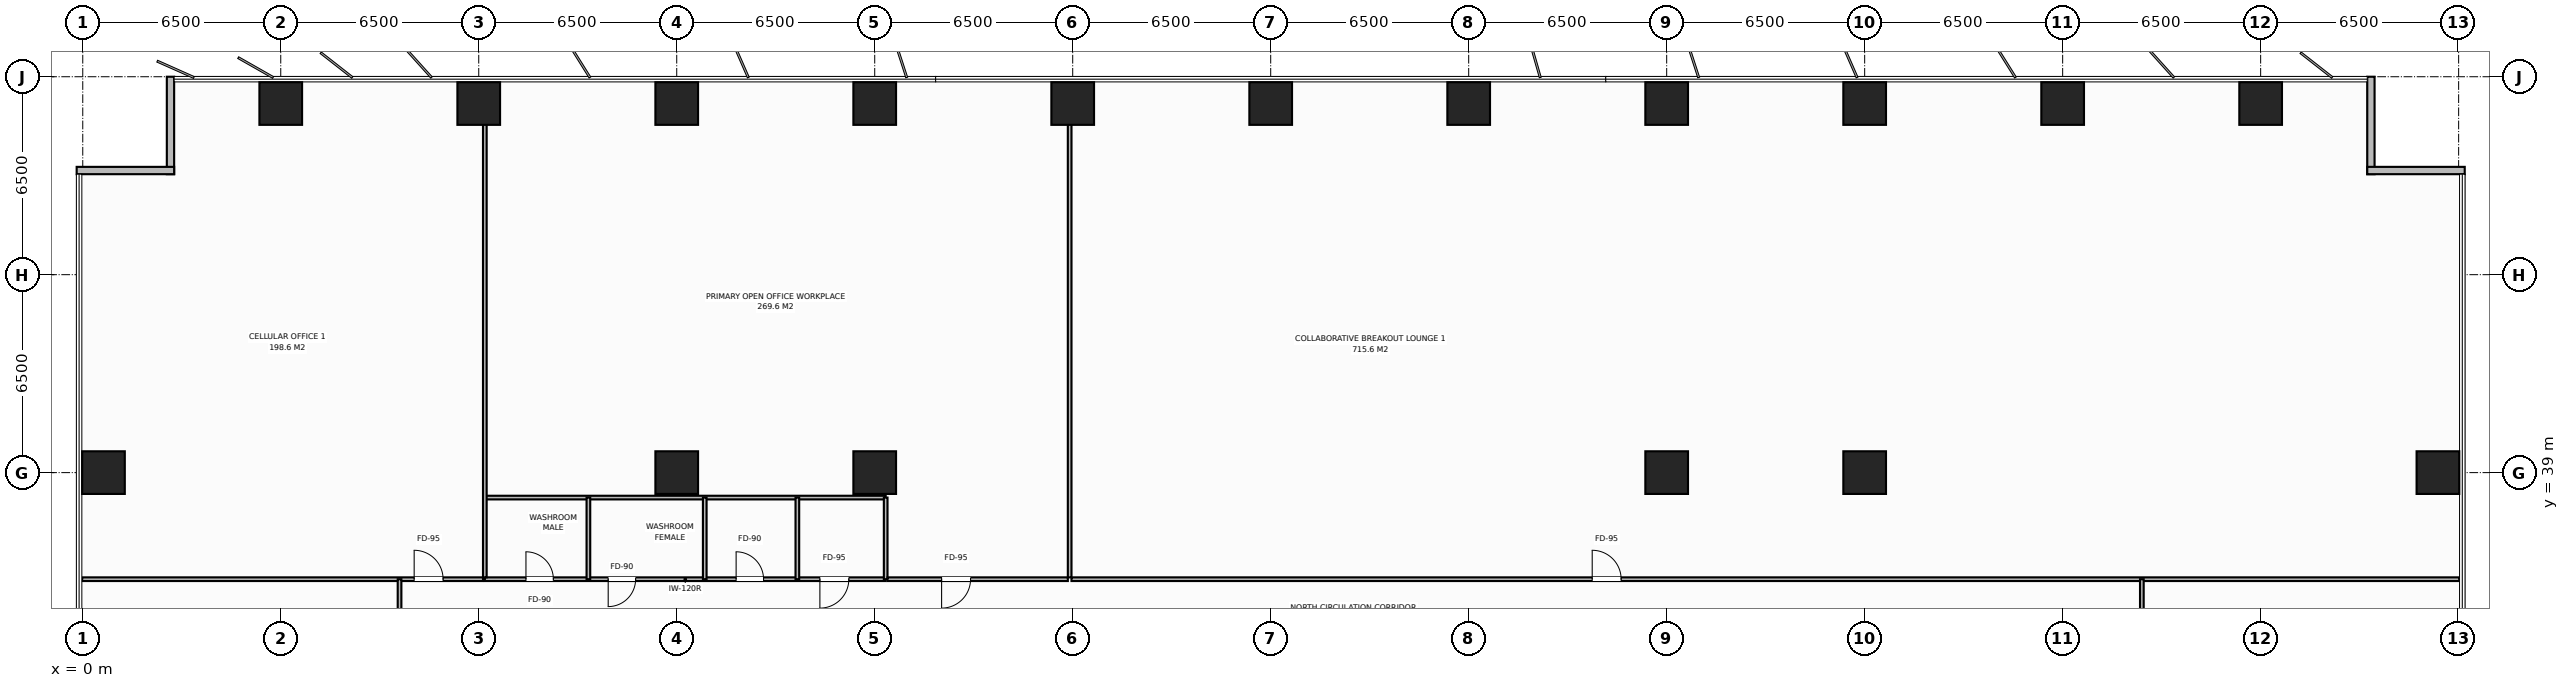
"""IFC4 building model, lengths in metres.
Left out: names, types, materials, properties, quantities, classifications, styles, units other than length and angle.
Written with IfcOpenShell. Run it as: python <this file> out.ifc"""

import sys

from ifc_helpers import new_model, si_unit, direction, frame, frame_2d, origin, origin_2d, place, context, subcontext, project, spatial, rectangle, extrude, element, fill, save


model = new_model("IFC4")
c1 = context("Model", 3, precision=1e-05, world=origin(), true_north=direction((0.0, 1.0)))
c2 = subcontext(c1, "Body", "Model", "MODEL_VIEW")
j1 = project(units=[si_unit("LENGTHUNIT", "METRE"), si_unit("PLANEANGLEUNIT", "RADIAN")], contexts=[c1])
p1 = place(None, origin())
s1 = spatial("IfcSite", under=j1, at=p1, CompositionType="ELEMENT")
p2 = place(p1, origin())
s2 = spatial("IfcBuilding", under=s1, at=p2, CompositionType="ELEMENT")
p3 = place(p2, frame((0.0, 0.0, 31.6)))
s3 = spatial("IfcBuildingStorey", under=s2, at=p3, CompositionType="ELEMENT", Elevation=31.6)
for number, where, z_axis, x_axis in (
    (1, (19.5, 39.0, 0.0), (0.0, 0.0, 1.0), (1.0, 0.0, 0.0)),
    (2, (58.5, 39.0, 0.0), (0.0, 0.0, 1.0), (1.0, 0.0, 0.0)),
    (3, (26.0, 39.0, 0.0), (0.0, 0.0, 1.0), (1.0, 0.0, 0.0)),
    (4, (52.0, 39.0, 0.0), (0.0, 0.0, 1.0), (1.0, 0.0, 0.0)),
    (5, (6.5, 51.12, 0.0), (0.0, 0.0, 1.0), (1.0, 0.0, 0.0)),
    (6, (13.0, 51.12, 0.0), (0.0, 0.0, 1.0), (1.0, 0.0, 0.0)),
    (7, (19.5, 51.12, 0.0), (0.0, 0.0, 1.0), (1.0, 0.0, 0.0)),
    (8, (26.0, 51.12, 0.0), (0.0, 0.0, 1.0), (1.0, 0.0, 0.0)),
    (9, (32.5, 51.12, 0.0), (0.0, 0.0, 1.0), (1.0, 0.0, 0.0)),
    (10, (39.0, 51.12, 0.0), (0.0, 0.0, 1.0), (1.0, 0.0, 0.0)),
    (11, (45.5, 51.12, 0.0), (0.0, 0.0, 1.0), (1.0, 0.0, 0.0)),
    (12, (52.0, 51.12, 0.0), (0.0, 0.0, 1.0), (1.0, 0.0, 0.0)),
    (13, (58.5, 51.12, 0.0), (0.0, 0.0, 1.0), (1.0, 0.0, 0.0)),
    (14, (65.0, 51.12, 0.0), (0.0, 0.0, 1.0), (1.0, 0.0, 0.0)),
    (15, (71.5, 51.12, 0.0), (0.0, 0.0, 1.0), (1.0, 0.0, 0.0)),
    (16, (0.68, 39.0, 0.0), (0.0, 0.0, 1.0), (1.0, 0.0, 0.0)),
    (17, (77.32, 39.0, 0.0), (0.0, 0.0, 1.0), (1.0, 0.0, 0.0)),
):
    element("IfcColumn", number, at=place(p3, frame(where, z_axis=z_axis, x_axis=x_axis)), inside=s3, PredefinedType="COLUMN", context=c2, shape_type="SweptSolid", body=[
        extrude(rectangle(XDim=1.4, YDim=1.4, at=origin_2d()), origin(), (0.0, 0.0, 1.0), 3.8),
    ])
for number, where, z_axis, x_axis in (
    (18, (2.88, 48.8, 0.0), (0.0, 0.0, 1.0), (0.0, 1.0, 0.0)),
    (19, (-0.2, 48.92, 0.0), (0.0, 0.0, 1.0), (1.0, 0.0, 0.0)),
    (20, (75.12, 52.0, 0.0), (0.0, 0.0, 1.0), (0.0, -1.0, 0.0)),
    (21, (75.0, 48.92, 0.0), (0.0, 0.0, 1.0), (1.0, 0.0, 0.0)),
):
    element("IfcWall", number, at=place(p3, frame(where, z_axis=z_axis, x_axis=x_axis)), inside=s3, PredefinedType="STANDARD", context=c2, shape_type="SweptSolid", body=[
        extrude(rectangle(XDim=3.2, YDim=0.24, at=frame_2d((1.6, 0.0))), origin(), (0.0, 0.0, 1.0), 3.55),
    ])
p4 = place(p3, frame((13.2, 35.5, 0.0), z_axis=(0.0, 0.0, 1.0), x_axis=(1.0, 0.0, 0.0)))
e22 = element("IfcWall", 22, at=p4, inside=s3, PredefinedType="PARTITIONING", context=c2, shape_type="SweptSolid", body=[
    extrude(rectangle(XDim=13.16, YDim=0.12, at=frame_2d((6.58, 0.0))), origin(), (0.0, 0.0, 1.0), 3.55),
])
p5 = place(p4, frame((1.35, 0.0, 0.0)))
e23 = element("IfcOpeningElement", 23, at=p5, cuts=e22, PredefinedType="OPENING", context=c2, shape_type="SweptSolid", body=[
    extrude(rectangle(XDim=0.9, YDim=2.15, at=frame_2d((0.45, 1.075))), frame((0.0, 0.07, 0.0), z_axis=(0.0, -1.0, 0.0), x_axis=(1.0, 0.0, 0.0)), (0.0, 0.0, 1.0), 0.14),
])
p6 = place(p4, frame((4.05, 0.0, 0.0)))
e24 = element("IfcOpeningElement", 24, at=p6, cuts=e22, PredefinedType="OPENING", context=c2, shape_type="SweptSolid", body=[
    extrude(rectangle(XDim=0.9, YDim=2.15, at=frame_2d((0.45, 1.075))), frame((0.0, 0.07, 0.0), z_axis=(0.0, -1.0, 0.0), x_axis=(1.0, 0.0, 0.0)), (0.0, 0.0, 1.0), 0.14),
])
p7 = place(p4, frame((8.25, 0.0, 0.0)))
e25 = element("IfcOpeningElement", 25, at=p7, cuts=e22, PredefinedType="OPENING", context=c2, shape_type="SweptSolid", body=[
    extrude(rectangle(XDim=0.9, YDim=2.15, at=frame_2d((0.45, 1.075))), frame((0.0, 0.07, 0.0), z_axis=(0.0, -1.0, 0.0), x_axis=(1.0, 0.0, 0.0)), (0.0, 0.0, 1.0), 0.14),
])
p8 = place(p4, frame((11.0, 0.0, 0.0)))
e26 = element("IfcOpeningElement", 26, at=p8, cuts=e22, PredefinedType="OPENING", context=c2, shape_type="SweptSolid", body=[
    extrude(rectangle(XDim=0.95, YDim=2.15, at=frame_2d((0.475, 1.075))), frame((0.0, 0.07, 0.0), z_axis=(0.0, -1.0, 0.0), x_axis=(1.0, 0.0, 0.0)), (0.0, 0.0, 1.0), 0.14),
])
p9 = place(p3, frame((13.2, 38.18, 0.0), z_axis=(0.0, 0.0, 1.0), x_axis=(1.0, 0.0, 0.0)))
e27 = element("IfcWall", 27, at=p9, inside=s3, PredefinedType="PARTITIONING", context=c2, shape_type="SweptSolid", body=[
    extrude(rectangle(XDim=13.16, YDim=0.12, at=frame_2d((6.58, 0.0))), origin(), (0.0, 0.0, 1.0), 3.55),
])
for number, where, z_axis, x_axis in (
    (28, (16.6, 35.5, 0.0), (0.0, 0.0, 1.0), (0.0, 1.0, 0.0)),
    (29, (20.42, 35.5, 0.0), (0.0, 0.0, 1.0), (0.0, 1.0, 0.0)),
    (30, (23.46, 35.5, 0.0), (0.0, 0.0, 1.0), (0.0, 1.0, 0.0)),
    (31, (26.36, 35.5, 0.0), (0.0, 0.0, 1.0), (0.0, 1.0, 0.0)),
):
    element("IfcWall", number, at=place(p3, frame(where, z_axis=z_axis, x_axis=x_axis)), inside=s3, PredefinedType="PARTITIONING", context=c2, shape_type="SweptSolid", body=[
        extrude(rectangle(XDim=2.68, YDim=0.12, at=frame_2d((1.34, 0.0))), origin(), (0.0, 0.0, 1.0), 3.55),
    ])
p10 = place(p3, frame((13.2, 35.56, 0.0), z_axis=(0.0, 0.0, 1.0), x_axis=(0.0, 1.0, 0.0)))
e32 = element("IfcWall", 32, at=p10, inside=s3, PredefinedType="PARTITIONING", context=c2, shape_type="SweptSolid", body=[
    extrude(rectangle(XDim=16.42, YDim=0.12, at=frame_2d((8.21, 0.0))), origin(), (0.0, 0.0, 1.0), 2.9),
])
p11 = place(p3, frame((-0.02, 35.5, 0.0), z_axis=(0.0, 0.0, 1.0), x_axis=(1.0, 0.0, 0.0)))
e33 = element("IfcWall", 33, at=p11, inside=s3, PredefinedType="PARTITIONING", context=c2, shape_type="SweptSolid", body=[
    extrude(rectangle(XDim=13.16, YDim=0.12, at=frame_2d((6.58, 0.0))), origin(), (0.0, 0.0, 1.0), 3.55),
])
p12 = place(p11, frame((10.9, 0.0, 0.0)))
e34 = element("IfcOpeningElement", 34, at=p12, cuts=e33, PredefinedType="OPENING", context=c2, shape_type="SweptSolid", body=[
    extrude(rectangle(XDim=0.95, YDim=2.15, at=frame_2d((0.475, 1.075))), frame((0.0, 0.07, 0.0), z_axis=(0.0, -1.0, 0.0), x_axis=(1.0, 0.0, 0.0)), (0.0, 0.0, 1.0), 0.14),
])
p13 = place(p3, frame((32.4, 35.56, 0.0), z_axis=(0.0, 0.0, 1.0), x_axis=(0.0, 1.0, 0.0)))
e35 = element("IfcWall", 35, at=p13, inside=s3, PredefinedType="PARTITIONING", context=c2, shape_type="SweptSolid", body=[
    extrude(rectangle(XDim=16.42, YDim=0.12, at=frame_2d((8.21, 0.0))), origin(), (0.0, 0.0, 1.0), 2.9),
])
p14 = place(p3, frame((26.42, 35.5, 0.0), z_axis=(0.0, 0.0, 1.0), x_axis=(1.0, 0.0, 0.0)))
e36 = element("IfcWall", 36, at=p14, inside=s3, PredefinedType="PARTITIONING", context=c2, shape_type="SweptSolid", body=[
    extrude(rectangle(XDim=5.92, YDim=0.12, at=frame_2d((2.96, 0.0))), origin(), (0.0, 0.0, 1.0), 3.55),
])
p15 = place(p14, frame((1.776, 0.0, 0.0)))
e37 = element("IfcOpeningElement", 37, at=p15, cuts=e36, PredefinedType="OPENING", context=c2, shape_type="SweptSolid", body=[
    extrude(rectangle(XDim=0.95, YDim=2.15, at=frame_2d((0.475, 1.075))), frame((0.0, 0.07, 0.0), z_axis=(0.0, -1.0, 0.0), x_axis=(1.0, 0.0, 0.0)), (0.0, 0.0, 1.0), 0.14),
])
p16 = place(p3, frame((32.46, 35.5, 0.0), z_axis=(0.0, 0.0, 1.0), x_axis=(1.0, 0.0, 0.0)))
e38 = element("IfcWall", 38, at=p16, inside=s3, PredefinedType="PARTITIONING", context=c2, shape_type="SweptSolid", body=[
    extrude(rectangle(XDim=45.56, YDim=0.12, at=frame_2d((22.78, 0.0))), origin(), (0.0, 0.0, 1.0), 3.55),
])
p17 = place(p16, frame((17.095, 0.0, 0.0)))
e39 = element("IfcOpeningElement", 39, at=p17, cuts=e38, PredefinedType="OPENING", context=c2, shape_type="SweptSolid", body=[
    extrude(rectangle(XDim=0.95, YDim=2.15, at=frame_2d((0.475, 1.075))), frame((0.0, 0.07, 0.0), z_axis=(0.0, -1.0, 0.0), x_axis=(1.0, 0.0, 0.0)), (0.0, 0.0, 1.0), 0.14),
])
p18 = place(p3, frame((10.4, 16.5, 0.0), z_axis=(0.0, 0.0, 1.0), x_axis=(0.0, 1.0, 0.0)))
e40 = element("IfcWall", 40, at=p18, inside=s3, PredefinedType="PARTITIONING", context=c2, shape_type="SweptSolid", body=[
    extrude(rectangle(XDim=19.0, YDim=0.12, at=frame_2d((9.5, 0.0))), origin(), (0.0, 0.0, 1.0), 3.55),
])
p19 = place(p18, frame((9.025, 0.0, 0.0)))
e41 = element("IfcOpeningElement", 41, at=p19, cuts=e40, PredefinedType="OPENING", context=c2, shape_type="SweptSolid", body=[
    extrude(rectangle(XDim=0.95, YDim=2.15, at=frame_2d((0.475, 1.075))), frame((0.0, 0.07, 0.0), z_axis=(0.0, -1.0, 0.0), x_axis=(1.0, 0.0, 0.0)), (0.0, 0.0, 1.0), 0.14),
])
p20 = place(p3, frame((67.6, 26.0, 0.0), z_axis=(0.0, 0.0, 1.0), x_axis=(0.0, 1.0, 0.0)))
e42 = element("IfcWall", 42, at=p20, inside=s3, PredefinedType="PARTITIONING", context=c2, shape_type="SweptSolid", body=[
    extrude(rectangle(XDim=9.5, YDim=0.12, at=frame_2d((4.75, 0.0))), origin(), (0.0, 0.0, 1.0), 3.55),
])
p21 = place(p20, frame((3.225, 0.0, 0.0)))
e43 = element("IfcOpeningElement", 43, at=p21, cuts=e42, PredefinedType="OPENING", context=c2, shape_type="SweptSolid", body=[
    extrude(rectangle(XDim=0.95, YDim=2.15, at=frame_2d((0.475, 1.075))), frame((0.0, 0.07, 0.0), z_axis=(0.0, -1.0, 0.0), x_axis=(1.0, 0.0, 0.0)), (0.0, 0.0, 1.0), 0.14),
])
p22 = place(p5, origin())
e44 = element("IfcDoor", 44, at=p22, inside=s3, OperationType="SINGLE_SWING_LEFT", PredefinedType="DOOR", context=c2, shape_type="SweptSolid", body=[
    extrude(rectangle(XDim=0.9, YDim=2.15, at=frame_2d((0.45, 1.075))), frame((0.0, 0.025, 0.0), z_axis=(0.0, -1.0, 0.0), x_axis=(1.0, 0.0, 0.0)), (0.0, 0.0, 1.0), 0.05),
])
fill(e23, e44)
p23 = place(p6, origin())
e45 = element("IfcDoor", 45, at=p23, inside=s3, OperationType="SINGLE_SWING_RIGHT", PredefinedType="DOOR", context=c2, shape_type="SweptSolid", body=[
    extrude(rectangle(XDim=0.9, YDim=2.15, at=frame_2d((0.45, 1.075))), frame((0.0, 0.025, 0.0), z_axis=(0.0, -1.0, 0.0), x_axis=(1.0, 0.0, 0.0)), (0.0, 0.0, 1.0), 0.05),
])
fill(e24, e45)
p24 = place(p7, origin())
e46 = element("IfcDoor", 46, at=p24, inside=s3, OperationType="SINGLE_SWING_LEFT", PredefinedType="DOOR", context=c2, shape_type="SweptSolid", body=[
    extrude(rectangle(XDim=0.9, YDim=2.15, at=frame_2d((0.45, 1.075))), frame((0.0, 0.025, 0.0), z_axis=(0.0, -1.0, 0.0), x_axis=(1.0, 0.0, 0.0)), (0.0, 0.0, 1.0), 0.05),
])
fill(e25, e46)
p25 = place(p8, origin())
e47 = element("IfcDoor", 47, at=p25, inside=s3, OperationType="SINGLE_SWING_RIGHT", PredefinedType="DOOR", context=c2, shape_type="SweptSolid", body=[
    extrude(rectangle(XDim=0.95, YDim=2.15, at=frame_2d((0.475, 1.075))), frame((0.0, 0.025, 0.0), z_axis=(0.0, -1.0, 0.0), x_axis=(1.0, 0.0, 0.0)), (0.0, 0.0, 1.0), 0.05),
])
fill(e26, e47)
p26 = place(p12, origin())
e48 = element("IfcDoor", 48, at=p26, inside=s3, OperationType="SINGLE_SWING_LEFT", PredefinedType="DOOR", context=c2, shape_type="SweptSolid", body=[
    extrude(rectangle(XDim=0.95, YDim=2.15, at=frame_2d((0.475, 1.075))), frame((0.0, 0.025, 0.0), z_axis=(0.0, -1.0, 0.0), x_axis=(1.0, 0.0, 0.0)), (0.0, 0.0, 1.0), 0.05),
])
fill(e34, e48)
p27 = place(p15, origin())
e49 = element("IfcDoor", 49, at=p27, inside=s3, OperationType="SINGLE_SWING_RIGHT", PredefinedType="DOOR", context=c2, shape_type="SweptSolid", body=[
    extrude(rectangle(XDim=0.95, YDim=2.15, at=frame_2d((0.475, 1.075))), frame((0.0, 0.025, 0.0), z_axis=(0.0, -1.0, 0.0), x_axis=(1.0, 0.0, 0.0)), (0.0, 0.0, 1.0), 0.05),
])
fill(e37, e49)
p28 = place(p17, origin())
e50 = element("IfcDoor", 50, at=p28, inside=s3, OperationType="SINGLE_SWING_LEFT", PredefinedType="DOOR", context=c2, shape_type="SweptSolid", body=[
    extrude(rectangle(XDim=0.95, YDim=2.15, at=frame_2d((0.475, 1.075))), frame((0.0, 0.025, 0.0), z_axis=(0.0, -1.0, 0.0), x_axis=(1.0, 0.0, 0.0)), (0.0, 0.0, 1.0), 0.05),
])
fill(e39, e50)
save(model, sys.argv[1])
